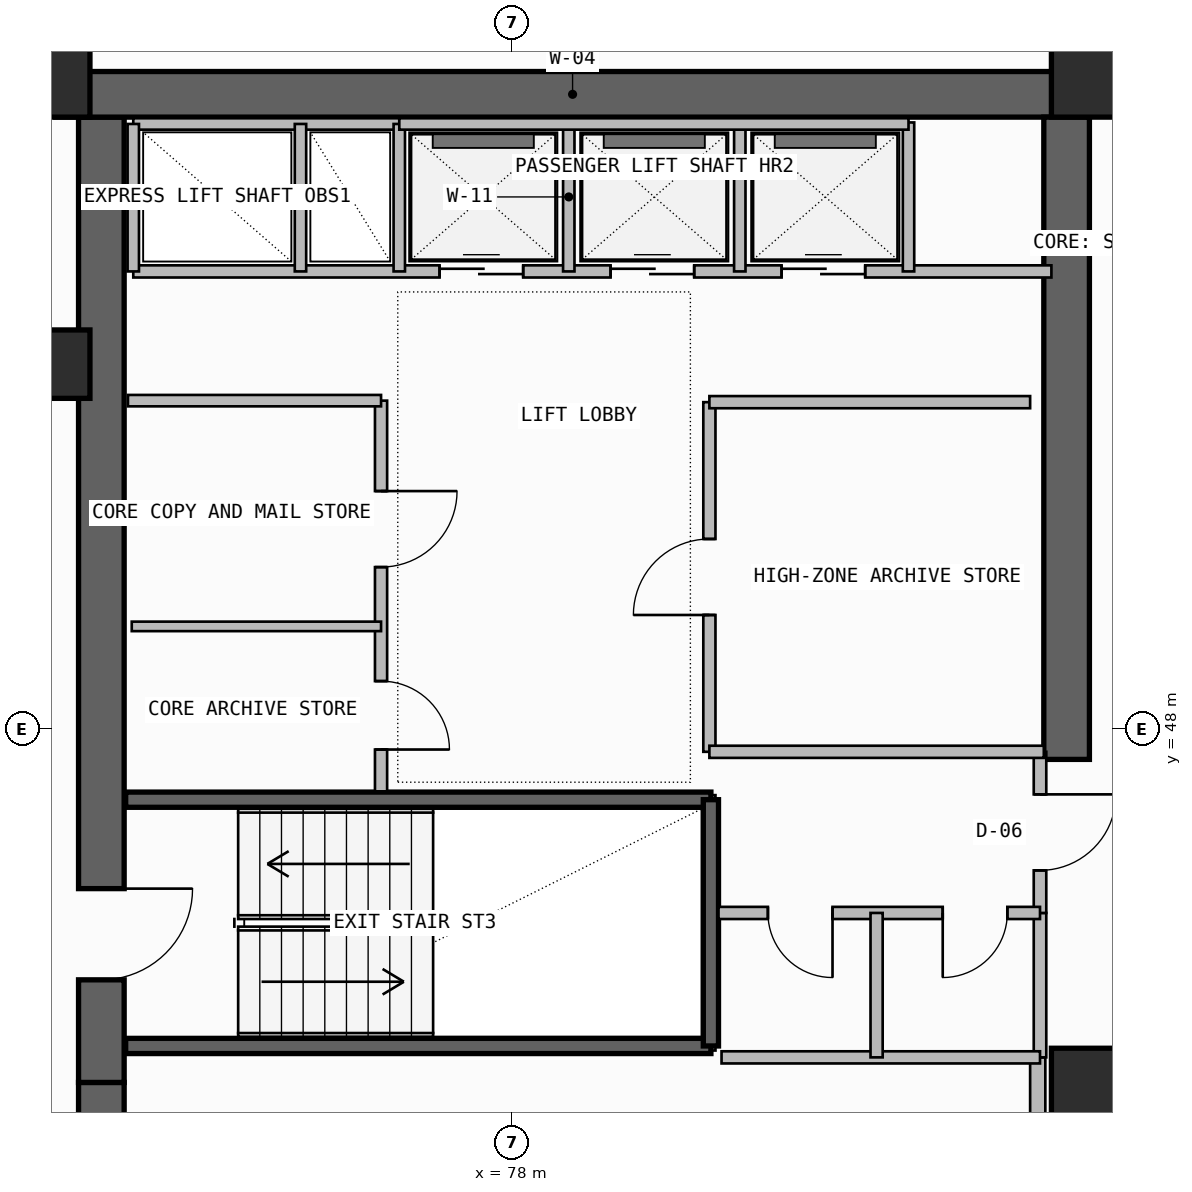
"""IFC4 building model, lengths in metres.
Left out: names, types, materials, properties, quantities, classifications, styles, units other than length and angle.
Written with IfcOpenShell. Run it as: python <this file> out.ifc"""

import sys

from ifc_helpers import new_model, si_unit, direction, frame, frame_2d, origin, origin_2d, place, context, subcontext, project, spatial, rectangle, extrude, element, fill, save


model = new_model("IFC4")
c1 = context("Model", 3, precision=1e-05, world=origin(), true_north=direction((0.0, 1.0)))
c2 = subcontext(c1, "Body", "Model", "MODEL_VIEW")
j1 = project(units=[si_unit("LENGTHUNIT", "METRE"), si_unit("PLANEANGLEUNIT", "RADIAN")], contexts=[c1])
p1 = place(None, origin())
s1 = spatial("IfcSite", under=j1, at=p1, CompositionType="ELEMENT")
p2 = place(p1, origin())
s2 = spatial("IfcBuilding", under=s1, at=p2, CompositionType="ELEMENT")
p3 = place(p2, frame((0.0, 0.0, 239.62)))
s3 = spatial("IfcBuildingStorey", under=s2, at=p3, CompositionType="ELEMENT", Elevation=239.62)
p4 = place(p3, frame((72.6, 35.5, -0.26), z_axis=(0.0, 0.0, 1.0), x_axis=(0.0, 1.0, 0.0)))
e1 = element("IfcWall", 1, at=p4, inside=s3, PredefinedType="SHEAR", context=c2, shape_type="SweptSolid", body=[
    extrude(rectangle(XDim=7.85, YDim=0.6, at=frame_2d((3.925, 0.0))), origin(), (0.0, 0.0, 1.0), 3.52),
])
p5 = place(p4, frame((1.45, 0.0, 0.26)))
e2 = element("IfcOpeningElement", 2, at=p5, cuts=e1, PredefinedType="OPENING", context=c2, shape_type="SweptSolid", body=[
    extrude(rectangle(XDim=1.2, YDim=2.2, at=frame_2d((0.6, 1.1))), frame((0.0, 0.31, 0.0), z_axis=(0.0, -1.0, 0.0), x_axis=(1.0, 0.0, 0.0)), (0.0, 0.0, 1.0), 0.62),
])
p6 = place(p3, frame((72.6, 43.35, -0.26), z_axis=(0.0, 0.0, 1.0), x_axis=(0.0, 1.0, 0.0)))
e3 = element("IfcWall", 3, at=p6, inside=s3, PredefinedType="SHEAR", context=c2, shape_type="SweptSolid", body=[
    extrude(rectangle(XDim=12.7, YDim=0.6, at=frame_2d((6.35, 0.0))), origin(), (0.0, 0.0, 1.0), 3.52),
])
p7 = place(p6, frame((1.35, 0.0, 0.26)))
e4 = element("IfcOpeningElement", 4, at=p7, cuts=e3, PredefinedType="OPENING", context=c2, shape_type="SweptSolid", body=[
    extrude(rectangle(XDim=1.2, YDim=2.2, at=frame_2d((0.6, 1.1))), frame((0.0, 0.31, 0.0), z_axis=(0.0, -1.0, 0.0), x_axis=(1.0, 0.0, 0.0)), (0.0, 0.0, 1.0), 0.62),
])
p8 = place(p3, frame((72.0, 56.35, -0.26), z_axis=(0.0, 0.0, 1.0), x_axis=(1.0, 0.0, 0.0)))
e5 = element("IfcWall", 5, at=p8, inside=s3, PredefinedType="SHEAR", context=c2, shape_type="SweptSolid", body=[
    extrude(rectangle(XDim=13.6, YDim=0.6, at=frame_2d((6.8, 0.0))), origin(), (0.0, 0.0, 1.0), 3.52),
])
p9 = place(p3, frame((85.3, 47.6, -0.26), z_axis=(0.0, 0.0, 1.0), x_axis=(0.0, 1.0, 0.0)))
e6 = element("IfcWall", 6, at=p9, inside=s3, PredefinedType="SHEAR", context=c2, shape_type="SweptSolid", body=[
    extrude(rectangle(XDim=8.45, YDim=0.6, at=frame_2d((4.225, 0.0))), origin(), (0.0, 0.0, 1.0), 3.52),
])
for number, where, z_axis, x_axis in (
    (7, (85.55, 43.35, 0.0), (0.0, 0.0, 1.0), (1.0, 0.0, 0.0)),
    (8, (72.0, 52.8, 0.0), (0.0, 0.0, 1.0), (1.0, 0.0, 0.0)),
    (9, (72.0, 56.5, 0.0), (0.0, 0.0, 1.0), (1.0, 0.0, 0.0)),
    (10, (85.55, 56.5, 0.0), (0.0, 0.0, 1.0), (1.0, 0.0, 0.0)),
):
    element("IfcColumn", number, at=place(p3, frame(where, z_axis=z_axis, x_axis=x_axis)), inside=s3, PredefinedType="COLUMN", context=c2, shape_type="SweptSolid", body=[
        extrude(rectangle(XDim=0.9, YDim=0.9, at=origin_2d()), origin(), (0.0, 0.0, 1.0), 3.52),
    ])
p10 = place(p3, frame((84.92, 38.85, 0.0), z_axis=(0.0, 0.0, 1.0), x_axis=(0.0, 1.0, 0.0)))
e11 = element("IfcWall", 11, at=p10, inside=s3, PredefinedType="SOLIDWALL", context=c2, shape_type="SweptSolid", body=[
    extrude(rectangle(XDim=4.83, YDim=0.2, at=frame_2d((2.415, 0.0))), origin(), (0.0, 0.0, 1.0), 3.26),
])
p11 = place(p10, frame((1.25, 0.0, 0.0)))
e12 = element("IfcOpeningElement", 12, at=p11, cuts=e11, PredefinedType="OPENING", context=c2, shape_type="SweptSolid", body=[
    extrude(rectangle(XDim=1.1, YDim=2.2, at=frame_2d((0.55, 1.1))), frame((0.0, 0.11, 0.0), z_axis=(0.0, -1.0, 0.0), x_axis=(1.0, 0.0, 0.0)), (0.0, 0.0, 1.0), 0.22),
])
for number, where, z_axis, x_axis in (
    (13, (72.92, 43.83, -0.26), (0.0, 0.0, 1.0), (1.0, 0.0, 0.0)),
    (14, (72.92, 47.07, -0.26), (0.0, 0.0, 1.0), (1.0, 0.0, 0.0)),
):
    element("IfcWall", number, at=place(p3, frame(where, z_axis=z_axis, x_axis=x_axis)), inside=s3, PredefinedType="SOLIDWALL", context=c2, shape_type="SweptSolid", body=[
        extrude(rectangle(XDim=7.7, YDim=0.2, at=frame_2d((3.85, 0.0))), origin(), (0.0, 0.0, 1.0), 3.52),
    ])
p12 = place(p3, frame((80.62, 43.83, -0.26), z_axis=(0.0, 0.0, 1.0), x_axis=(0.0, 1.0, 0.0)))
e15 = element("IfcWall", 15, at=p12, inside=s3, PredefinedType="SOLIDWALL", context=c2, shape_type="SweptSolid", body=[
    extrude(rectangle(XDim=3.24, YDim=0.2, at=frame_2d((1.62, 0.0))), origin(), (0.0, 0.0, 1.0), 3.52),
])
p13 = place(p3, frame((84.95, 43.68, 0.0), z_axis=(0.0, 0.0, 1.0), x_axis=(0.0, 1.0, 0.0)))
e16 = element("IfcWall", 16, at=p13, inside=s3, PredefinedType="PLUMBINGWALL", context=c2, shape_type="SweptSolid", body=[
    extrude(rectangle(XDim=1.9, YDim=0.165, at=frame_2d((0.95, 0.0))), origin(), (0.0, 0.0, 1.0), 3.26),
])
p14 = place(p3, frame((84.95, 45.58, 0.0), z_axis=(0.0, 0.0, 1.0), x_axis=(0.0, 1.0, 0.0)))
e17 = element("IfcWall", 17, at=p14, inside=s3, PredefinedType="PARTITIONING", context=c2, shape_type="SweptSolid", body=[
    extrude(rectangle(XDim=2.12, YDim=0.165, at=frame_2d((1.06, 0.0))), origin(), (0.0, 0.0, 1.0), 3.26),
])
p15 = place(p14, frame((0.56, 0.0, 0.0)))
e18 = element("IfcOpeningElement", 18, at=p15, cuts=e17, PredefinedType="OPENING", context=c2, shape_type="SweptSolid", body=[
    extrude(rectangle(XDim=1.0, YDim=2.2, at=frame_2d((0.5, 1.1))), frame((0.0, 0.093, 0.0), z_axis=(0.0, -1.0, 0.0), x_axis=(1.0, 0.0, 0.0)), (0.0, 0.0, 1.0), 0.185),
])
p16 = place(p3, frame((80.72, 45.58, 0.0), z_axis=(0.0, 0.0, 1.0), x_axis=(1.0, 0.0, 0.0)))
e19 = element("IfcWall", 19, at=p16, inside=s3, PredefinedType="PLUMBINGWALL", context=c2, shape_type="SweptSolid", body=[
    extrude(rectangle(XDim=4.23, YDim=0.16, at=frame_2d((2.115, 0.0))), origin(), (0.0, 0.0, 1.0), 3.26),
])
p17 = place(p16, frame((0.65, 0.0, 0.0)))
e20 = element("IfcOpeningElement", 20, at=p17, cuts=e19, PredefinedType="OPENING", context=c2, shape_type="SweptSolid", body=[
    extrude(rectangle(XDim=0.85, YDim=2.05, at=frame_2d((0.425, 1.025))), frame((0.0, 0.09, 0.0), z_axis=(0.0, -1.0, 0.0), x_axis=(1.0, 0.0, 0.0)), (0.0, 0.0, 1.0), 0.18),
])
p18 = place(p16, frame((2.95, 0.0, 0.0)))
e21 = element("IfcOpeningElement", 21, at=p18, cuts=e19, PredefinedType="OPENING", context=c2, shape_type="SweptSolid", body=[
    extrude(rectangle(XDim=0.85, YDim=2.05, at=frame_2d((0.425, 1.025))), frame((0.0, 0.09, 0.0), z_axis=(0.0, -1.0, 0.0), x_axis=(1.0, 0.0, 0.0)), (0.0, 0.0, 1.0), 0.18),
])
p19 = place(p3, frame((80.76, 43.68, 0.0), z_axis=(0.0, 0.0, 1.0), x_axis=(1.0, 0.0, 0.0)))
e22 = element("IfcWall", 22, at=p19, inside=s3, PredefinedType="PLUMBINGWALL", context=c2, shape_type="SweptSolid", body=[
    extrude(rectangle(XDim=4.19, YDim=0.16, at=frame_2d((2.095, 0.0))), origin(), (0.0, 0.0, 1.0), 3.26),
])
p20 = place(p3, frame((82.8, 43.68, 0.0), z_axis=(0.0, 0.0, 1.0), x_axis=(0.0, 1.0, 0.0)))
e23 = element("IfcWall", 23, at=p20, inside=s3, PredefinedType="PLUMBINGWALL", context=c2, shape_type="SweptSolid", body=[
    extrude(rectangle(XDim=1.9, YDim=0.16, at=frame_2d((0.95, 0.0))), origin(), (0.0, 0.0, 1.0), 3.26),
])
p21 = place(p3, frame((76.28, 47.18, 0.0), z_axis=(0.0, 0.0, 1.0), x_axis=(0.0, 1.0, 0.0)))
e24 = element("IfcWall", 24, at=p21, inside=s3, PredefinedType="SOLIDWALL", context=c2, shape_type="SweptSolid", body=[
    extrude(rectangle(XDim=5.14, YDim=0.16, at=frame_2d((2.57, 0.0))), origin(), (0.0, 0.0, 1.0), 3.26),
])
p22 = place(p21, frame((0.55, 0.0, 0.0)))
e25 = element("IfcOpeningElement", 25, at=p22, cuts=e24, PredefinedType="OPENING", context=c2, shape_type="SweptSolid", body=[
    extrude(rectangle(XDim=0.9, YDim=2.1, at=frame_2d((0.45, 1.05))), frame((0.0, 0.09, 0.0), z_axis=(0.0, -1.0, 0.0), x_axis=(1.0, 0.0, 0.0)), (0.0, 0.0, 1.0), 0.18),
])
p23 = place(p21, frame((2.95, 0.0, 0.0)))
e26 = element("IfcOpeningElement", 26, at=p23, cuts=e24, PredefinedType="OPENING", context=c2, shape_type="SweptSolid", body=[
    extrude(rectangle(XDim=1.0, YDim=2.2, at=frame_2d((0.5, 1.1))), frame((0.0, 0.09, 0.0), z_axis=(0.0, -1.0, 0.0), x_axis=(1.0, 0.0, 0.0)), (0.0, 0.0, 1.0), 0.18),
])
p24 = place(p3, frame((72.95, 52.32, 0.0), z_axis=(0.0, 0.0, 1.0), x_axis=(1.0, 0.0, 0.0)))
e27 = element("IfcWall", 27, at=p24, inside=s3, PredefinedType="SOLIDWALL", context=c2, shape_type="SweptSolid", body=[
    extrude(rectangle(XDim=3.33, YDim=0.15, at=frame_2d((1.665, 0.0))), origin(), (0.0, 0.0, 1.0), 3.26),
])
p25 = place(p3, frame((73.0, 49.35, 0.0), z_axis=(0.0, 0.0, 1.0), x_axis=(1.0, 0.0, 0.0)))
e28 = element("IfcWall", 28, at=p25, inside=s3, PredefinedType="PARTITIONING", context=c2, shape_type="SweptSolid", body=[
    extrude(rectangle(XDim=3.28, YDim=0.125, at=frame_2d((1.64, 0.0))), origin(), (0.0, 0.0, 1.0), 3.26),
])
p26 = place(p3, frame((80.6, 47.7, 0.0), z_axis=(0.0, 0.0, 1.0), x_axis=(0.0, 1.0, 0.0)))
e29 = element("IfcWall", 29, at=p26, inside=s3, PredefinedType="SOLIDWALL", context=c2, shape_type="SweptSolid", body=[
    extrude(rectangle(XDim=4.6, YDim=0.16, at=frame_2d((2.3, 0.0))), origin(), (0.0, 0.0, 1.0), 3.26),
])
p27 = place(p26, frame((1.8, 0.0, 0.0)))
e30 = element("IfcOpeningElement", 30, at=p27, cuts=e29, PredefinedType="OPENING", context=c2, shape_type="SweptSolid", body=[
    extrude(rectangle(XDim=1.0, YDim=2.2, at=frame_2d((0.5, 1.1))), frame((0.0, 0.09, 0.0), z_axis=(0.0, -1.0, 0.0), x_axis=(1.0, 0.0, 0.0)), (0.0, 0.0, 1.0), 0.18),
])
p28 = place(p3, frame((80.6, 47.7, 0.0), z_axis=(0.0, 0.0, 1.0), x_axis=(1.0, 0.0, 0.0)))
e31 = element("IfcWall", 31, at=p28, inside=s3, PredefinedType="SOLIDWALL", context=c2, shape_type="SweptSolid", body=[
    extrude(rectangle(XDim=4.4, YDim=0.16, at=frame_2d((2.2, 0.0))), origin(), (0.0, 0.0, 1.0), 3.26),
])
p29 = place(p3, frame((80.6, 52.3, 0.0), z_axis=(0.0, 0.0, 1.0), x_axis=(1.0, 0.0, 0.0)))
e32 = element("IfcWall", 32, at=p29, inside=s3, PredefinedType="SOLIDWALL", context=c2, shape_type="SweptSolid", body=[
    extrude(rectangle(XDim=4.22, YDim=0.16, at=frame_2d((2.11, 0.0))), origin(), (0.0, 0.0, 1.0), 3.26),
])
p30 = place(p3, frame((73.02, 54.02, 0.0), z_axis=(0.0, 0.0, 1.0), x_axis=(1.0, 0.0, 0.0)))
e33 = element("IfcWall", 33, at=p30, inside=s3, PredefinedType="SOLIDWALL", context=c2, shape_type="SweptSolid", body=[
    extrude(rectangle(XDim=12.08, YDim=0.16, at=frame_2d((6.04, 0.0))), origin(), (0.0, 0.0, 1.0), 3.26),
])
p31 = place(p30, frame((4.03, 0.0, 0.0)))
e34 = element("IfcOpeningElement", 34, at=p31, cuts=e33, PredefinedType="OPENING", context=c2, shape_type="SweptSolid", body=[
    extrude(rectangle(XDim=1.1, YDim=2.25, at=frame_2d((0.55, 1.125))), frame((0.0, 0.09, 0.0), z_axis=(0.0, -1.0, 0.0), x_axis=(1.0, 0.0, 0.0)), (0.0, 0.0, 1.0), 0.18),
])
p32 = place(p30, frame((6.28, 0.0, 0.0)))
e35 = element("IfcOpeningElement", 35, at=p32, cuts=e33, PredefinedType="OPENING", context=c2, shape_type="SweptSolid", body=[
    extrude(rectangle(XDim=1.1, YDim=2.25, at=frame_2d((0.55, 1.125))), frame((0.0, 0.09, 0.0), z_axis=(0.0, -1.0, 0.0), x_axis=(1.0, 0.0, 0.0)), (0.0, 0.0, 1.0), 0.18),
])
p33 = place(p30, frame((8.53, 0.0, 0.0)))
e36 = element("IfcOpeningElement", 36, at=p33, cuts=e33, PredefinedType="OPENING", context=c2, shape_type="SweptSolid", body=[
    extrude(rectangle(XDim=1.1, YDim=2.25, at=frame_2d((0.55, 1.125))), frame((0.0, 0.09, 0.0), z_axis=(0.0, -1.0, 0.0), x_axis=(1.0, 0.0, 0.0)), (0.0, 0.0, 1.0), 0.18),
])
p34 = place(p3, frame((73.02, 55.96, 0.0), z_axis=(0.0, 0.0, 1.0), x_axis=(1.0, 0.0, 0.0)))
e37 = element("IfcWall", 37, at=p34, inside=s3, PredefinedType="SOLIDWALL", context=c2, shape_type="SweptSolid", body=[
    extrude(rectangle(XDim=3.5, YDim=0.15, at=frame_2d((1.75, 0.0))), origin(), (0.0, 0.0, 1.0), 3.26),
])
p35 = place(p3, frame((73.02, 54.02, 0.0), z_axis=(0.0, 0.0, 1.0), x_axis=(0.0, 1.0, 0.0)))
e38 = element("IfcWall", 38, at=p35, inside=s3, PredefinedType="PLUMBINGWALL", context=c2, shape_type="SweptSolid", body=[
    extrude(rectangle(XDim=1.94, YDim=0.15, at=frame_2d((0.97, 0.0))), origin(), (0.0, 0.0, 1.0), 3.26),
])
p36 = place(p3, frame((76.52, 54.02, 0.0), z_axis=(0.0, 0.0, 1.0), x_axis=(0.0, 1.0, 0.0)))
e39 = element("IfcWall", 39, at=p36, inside=s3, PredefinedType="SOLIDWALL", context=c2, shape_type="SweptSolid", body=[
    extrude(rectangle(XDim=1.94, YDim=0.15, at=frame_2d((0.97, 0.0))), origin(), (0.0, 0.0, 1.0), 3.26),
])
p37 = place(p3, frame((75.22, 54.02, 0.0), z_axis=(0.0, 0.0, 1.0), x_axis=(0.0, 1.0, 0.0)))
e40 = element("IfcWall", 40, at=p37, inside=s3, PredefinedType="PLUMBINGWALL", context=c2, shape_type="SweptSolid", body=[
    extrude(rectangle(XDim=1.94, YDim=0.15, at=frame_2d((0.97, 0.0))), origin(), (0.0, 0.0, 1.0), 3.26),
])
for number, where, z_axis, x_axis in (
    (41, (78.75, 54.02, 0.0), (0.0, 0.0, 1.0), (0.0, 1.0, 0.0)),
    (42, (81.0, 54.02, 0.0), (0.0, 0.0, 1.0), (0.0, 1.0, 0.0)),
):
    element("IfcWall", number, at=place(p3, frame(where, z_axis=z_axis, x_axis=x_axis)), inside=s3, PredefinedType="PLUMBINGWALL", context=c2, shape_type="SweptSolid", body=[
        extrude(rectangle(XDim=1.96, YDim=0.15, at=frame_2d((0.98, 0.0))), origin(), (0.0, 0.0, 1.0), 3.26),
    ])
p38 = place(p3, frame((83.22, 54.02, 0.0), z_axis=(0.0, 0.0, 1.0), x_axis=(0.0, 1.0, 0.0)))
e43 = element("IfcWall", 43, at=p38, inside=s3, PredefinedType="SOLIDWALL", context=c2, shape_type="SweptSolid", body=[
    extrude(rectangle(XDim=1.96, YDim=0.15, at=frame_2d((0.98, 0.0))), origin(), (0.0, 0.0, 1.0), 3.26),
])
p39 = place(p3, frame((76.52, 55.96, 0.0), z_axis=(0.0, 0.0, 1.0), x_axis=(1.0, 0.0, 0.0)))
e44 = element("IfcWall", 44, at=p39, inside=s3, PredefinedType="SOLIDWALL", context=c2, shape_type="SweptSolid", body=[
    extrude(rectangle(XDim=6.7, YDim=0.15, at=frame_2d((3.35, 0.0))), origin(), (0.0, 0.0, 1.0), 3.26),
])
p40 = place(p7, frame((1.2, 0.0, 0.0), z_axis=(0.0, 0.0, 1.0), x_axis=(-1.0, 0.0, 0.0)))
e45 = element("IfcDoor", 45, at=p40, inside=s3, OperationType="SINGLE_SWING_LEFT", PredefinedType="USERDEFINED", context=c2, shape_type="SweptSolid", body=[
    extrude(rectangle(XDim=1.2, YDim=2.2, at=frame_2d((0.6, 1.1))), frame((0.0, 0.025, 0.0), z_axis=(0.0, -1.0, 0.0), x_axis=(1.0, 0.0, 0.0)), (0.0, 0.0, 1.0), 0.05),
])
fill(e4, e45)
p41 = place(p15, frame((1.0, 0.0, 0.0), z_axis=(0.0, 0.0, 1.0), x_axis=(-1.0, 0.0, 0.0)))
e46 = element("IfcDoor", 46, at=p41, inside=s3, OperationType="SINGLE_SWING_LEFT", PredefinedType="DOOR", context=c2, shape_type="SweptSolid", body=[
    extrude(rectangle(XDim=1.0, YDim=2.2, at=frame_2d((0.5, 1.1))), frame((0.0, 0.025, 0.0), z_axis=(0.0, -1.0, 0.0), x_axis=(1.0, 0.0, 0.0)), (0.0, 0.0, 1.0), 0.05),
])
fill(e18, e46)
p42 = place(p17, frame((0.85, 0.0, 0.0), z_axis=(0.0, 0.0, 1.0), x_axis=(-1.0, 0.0, 0.0)))
e47 = element("IfcDoor", 47, at=p42, inside=s3, OperationType="SINGLE_SWING_LEFT", PredefinedType="DOOR", context=c2, shape_type="SweptSolid", body=[
    extrude(rectangle(XDim=0.85, YDim=2.05, at=frame_2d((0.425, 1.025))), frame((0.0, 0.025, 0.0), z_axis=(0.0, -1.0, 0.0), x_axis=(1.0, 0.0, 0.0)), (0.0, 0.0, 1.0), 0.05),
])
fill(e20, e47)
p43 = place(p18, frame((0.85, 0.0, 0.0), z_axis=(0.0, 0.0, 1.0), x_axis=(-1.0, 0.0, 0.0)))
e48 = element("IfcDoor", 48, at=p43, inside=s3, OperationType="SINGLE_SWING_RIGHT", PredefinedType="DOOR", context=c2, shape_type="SweptSolid", body=[
    extrude(rectangle(XDim=0.85, YDim=2.05, at=frame_2d((0.425, 1.025))), frame((0.0, 0.025, 0.0), z_axis=(0.0, -1.0, 0.0), x_axis=(1.0, 0.0, 0.0)), (0.0, 0.0, 1.0), 0.05),
])
fill(e21, e48)
p44 = place(p22, frame((0.9, 0.0, 0.0), z_axis=(0.0, 0.0, 1.0), x_axis=(-1.0, 0.0, 0.0)))
e49 = element("IfcDoor", 49, at=p44, inside=s3, OperationType="SINGLE_SWING_RIGHT", PredefinedType="DOOR", context=c2, shape_type="SweptSolid", body=[
    extrude(rectangle(XDim=0.9, YDim=2.1, at=frame_2d((0.45, 1.05))), frame((0.0, 0.025, 0.0), z_axis=(0.0, -1.0, 0.0), x_axis=(1.0, 0.0, 0.0)), (0.0, 0.0, 1.0), 0.05),
])
fill(e25, e49)
p45 = place(p23, frame((1.0, 0.0, 0.0), z_axis=(0.0, 0.0, 1.0), x_axis=(-1.0, 0.0, 0.0)))
e50 = element("IfcDoor", 50, at=p45, inside=s3, OperationType="SINGLE_SWING_LEFT", PredefinedType="DOOR", context=c2, shape_type="SweptSolid", body=[
    extrude(rectangle(XDim=1.0, YDim=2.2, at=frame_2d((0.5, 1.1))), frame((0.0, 0.025, 0.0), z_axis=(0.0, -1.0, 0.0), x_axis=(1.0, 0.0, 0.0)), (0.0, 0.0, 1.0), 0.05),
])
fill(e26, e50)
p46 = place(p27, origin())
e51 = element("IfcDoor", 51, at=p46, inside=s3, OperationType="SINGLE_SWING_LEFT", PredefinedType="DOOR", context=c2, shape_type="SweptSolid", body=[
    extrude(rectangle(XDim=1.0, YDim=2.2, at=frame_2d((0.5, 1.1))), frame((0.0, 0.025, 0.0), z_axis=(0.0, -1.0, 0.0), x_axis=(1.0, 0.0, 0.0)), (0.0, 0.0, 1.0), 0.05),
])
fill(e30, e51)
p47 = place(p31, origin())
e52 = element("IfcDoor", 52, at=p47, inside=s3, OperationType="DOUBLE_DOOR_SLIDING", PredefinedType="DOOR", context=c2, shape_type="SweptSolid", body=[
    extrude(rectangle(XDim=1.1, YDim=2.25, at=frame_2d((0.55, 1.125))), frame((0.0, 0.025, 0.0), z_axis=(0.0, -1.0, 0.0), x_axis=(1.0, 0.0, 0.0)), (0.0, 0.0, 1.0), 0.05),
])
fill(e34, e52)
p48 = place(p32, origin())
e53 = element("IfcDoor", 53, at=p48, inside=s3, OperationType="DOUBLE_DOOR_SLIDING", PredefinedType="DOOR", context=c2, shape_type="SweptSolid", body=[
    extrude(rectangle(XDim=1.1, YDim=2.25, at=frame_2d((0.55, 1.125))), frame((0.0, 0.025, 0.0), z_axis=(0.0, -1.0, 0.0), x_axis=(1.0, 0.0, 0.0)), (0.0, 0.0, 1.0), 0.05),
])
fill(e35, e53)
p49 = place(p33, origin())
e54 = element("IfcDoor", 54, at=p49, inside=s3, OperationType="DOUBLE_DOOR_SLIDING", PredefinedType="DOOR", context=c2, shape_type="SweptSolid", body=[
    extrude(rectangle(XDim=1.1, YDim=2.25, at=frame_2d((0.55, 1.125))), frame((0.0, 0.025, 0.0), z_axis=(0.0, -1.0, 0.0), x_axis=(1.0, 0.0, 0.0)), (0.0, 0.0, 1.0), 0.05),
])
fill(e36, e54)
save(model, sys.argv[1])
